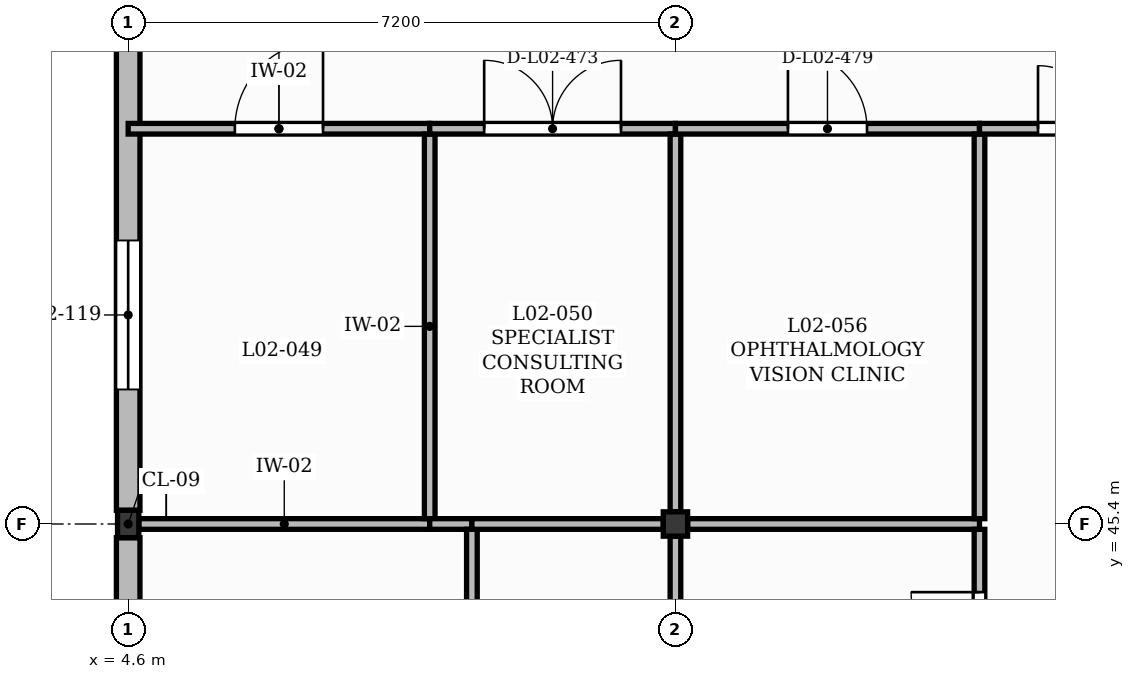
"""IFC4 building model, lengths in metres.
Left out: names, types, materials, properties, quantities, classifications, styles, units other than length and angle.
Written with IfcOpenShell. Run it as: python <this file> out.ifc"""

import sys

from ifc_helpers import new_model, si_unit, direction, frame, frame_2d, origin, origin_2d, place, context, subcontext, project, spatial, rectangle, extrude, element, fill, save


model = new_model("IFC4")
c1 = context("Model", 3, precision=1e-05, world=origin(), true_north=direction((0.0, 1.0)))
c2 = subcontext(c1, "Body", "Model", "MODEL_VIEW")
j1 = project(units=[si_unit("LENGTHUNIT", "METRE"), si_unit("PLANEANGLEUNIT", "RADIAN")], contexts=[c1])
p1 = place(None, origin())
s1 = spatial("IfcSite", under=j1, at=p1, CompositionType="ELEMENT")
p2 = place(p1, origin())
s2 = spatial("IfcBuilding", under=s1, at=p2, CompositionType="ELEMENT")
p3 = place(p2, frame((0.0, 0.0, 9.0)))
s3 = spatial("IfcBuildingStorey", under=s2, at=p3, CompositionType="ELEMENT", Elevation=9.0)
p4 = place(p3, frame((4.6, 45.4, 0.0), z_axis=(0.0, 0.0, 1.0), x_axis=(1.0, 0.0, 0.0)))
e1 = element("IfcColumn", 1, at=p4, inside=s3, PredefinedType="COLUMN", context=c2, shape_type="SweptSolid", body=[
    extrude(rectangle(XDim=0.28, YDim=0.36, at=origin_2d()), origin(), (0.0, 0.0, 1.0), 3.99),
])
p5 = place(p3, frame((11.8, 45.4, 0.0), z_axis=(0.0, 0.0, 1.0), x_axis=(1.0, 0.0, 0.0)))
e2 = element("IfcColumn", 2, at=p5, inside=s3, PredefinedType="COLUMN", context=c2, shape_type="SweptSolid", body=[
    extrude(rectangle(XDim=0.32, YDim=0.32, at=origin_2d()), origin(), (0.0, 0.0, 1.0), 3.99),
])
p6 = place(p3, frame((4.6, 36.96, 0.0), z_axis=(0.0, 0.0, 1.0), x_axis=(0.0, 1.0, 0.0)))
e3 = element("IfcWall", 3, at=p6, inside=s3, PredefinedType="SOLIDWALL", context=c2, shape_type="SweptSolid", body=[
    extrude(rectangle(XDim=8.26, YDim=0.31, at=frame_2d((4.13, 0.0))), origin(), (0.0, 0.0, 1.0), 3.53),
])
p7 = place(p6, frame((2.795, 0.0, 1.05)))
e4 = element("IfcOpeningElement", 4, at=p7, cuts=e3, PredefinedType="OPENING", context=c2, shape_type="SweptSolid", body=[
    extrude(rectangle(XDim=1.68, YDim=1.65, at=frame_2d((0.84, 0.825))), frame((0.0, 0.165, 0.0), z_axis=(0.0, -1.0, 0.0), x_axis=(1.0, 0.0, 0.0)), (0.0, 0.0, 1.0), 0.33),
])
p8 = place(p6, frame((5.155, 0.0, 1.05)))
e5 = element("IfcOpeningElement", 5, at=p8, cuts=e3, PredefinedType="OPENING", context=c2, shape_type="SweptSolid", body=[
    extrude(rectangle(XDim=1.68, YDim=1.65, at=frame_2d((0.84, 0.825))), frame((0.0, 0.165, 0.0), z_axis=(0.0, -1.0, 0.0), x_axis=(1.0, 0.0, 0.0)), (0.0, 0.0, 1.0), 0.33),
])
p9 = place(p3, frame((4.6, 45.58, 0.0), z_axis=(0.0, 0.0, 1.0), x_axis=(0.0, 1.0, 0.0)))
e6 = element("IfcWall", 6, at=p9, inside=s3, PredefinedType="SOLIDWALL", context=c2, shape_type="SweptSolid", body=[
    extrude(rectangle(XDim=6.86, YDim=0.31, at=frame_2d((3.43, 0.0))), origin(), (0.0, 0.0, 1.0), 3.53),
])
p10 = place(p9, frame((1.59, 0.0, 1.05)))
e7 = element("IfcOpeningElement", 7, at=p10, cuts=e6, PredefinedType="OPENING", context=c2, shape_type="SweptSolid", body=[
    extrude(rectangle(XDim=1.96, YDim=1.65, at=frame_2d((0.98, 0.825))), frame((0.0, 0.165, 0.0), z_axis=(0.0, -1.0, 0.0), x_axis=(1.0, 0.0, 0.0)), (0.0, 0.0, 1.0), 0.33),
])
p11 = place(p3, frame((4.74, 45.4, 0.0), z_axis=(0.0, 0.0, 1.0), x_axis=(1.0, 0.0, 0.0)))
e8 = element("IfcWall", 8, at=p11, inside=s3, PredefinedType="PARTITIONING", context=c2, shape_type="SweptSolid", body=[
    extrude(rectangle(XDim=3.827, YDim=0.14, at=frame_2d((1.914, 0.0))), origin(), (0.0, 0.0, 1.0), 3.39),
])
p12 = place(p3, frame((4.6, 50.6, 0.0), z_axis=(0.0, 0.0, 1.0), x_axis=(1.0, 0.0, 0.0)))
e9 = element("IfcWall", 9, at=p12, inside=s3, PredefinedType="PARTITIONING", context=c2, shape_type="SweptSolid", body=[
    extrude(rectangle(XDim=3.967, YDim=0.14, at=frame_2d((1.983, 0.0))), origin(), (0.0, 0.0, 1.0), 3.96),
])
p13 = place(p12, frame((1.404, 0.0, 0.0)))
e10 = element("IfcOpeningElement", 10, at=p13, cuts=e9, PredefinedType="OPENING", context=c2, shape_type="SweptSolid", body=[
    extrude(rectangle(XDim=1.16, YDim=2.1, at=frame_2d((0.58, 1.05))), frame((0.0, 0.08, 0.0), z_axis=(0.0, -1.0, 0.0), x_axis=(1.0, 0.0, 0.0)), (0.0, 0.0, 1.0), 0.16),
])
p14 = place(p3, frame((8.567, 45.47, 0.0), z_axis=(0.0, 0.0, 1.0), x_axis=(0.0, 1.0, 0.0)))
e11 = element("IfcWall", 11, at=p14, inside=s3, PredefinedType="PARTITIONING", context=c2, shape_type="SweptSolid", body=[
    extrude(rectangle(XDim=5.06, YDim=0.14, at=frame_2d((2.53, 0.0))), origin(), (0.0, 0.0, 1.0), 3.96),
])
p15 = place(p3, frame((8.567, 45.4, 0.0), z_axis=(0.0, 0.0, 1.0), x_axis=(1.0, 0.0, 0.0)))
e12 = element("IfcWall", 12, at=p15, inside=s3, PredefinedType="PARTITIONING", context=c2, shape_type="SweptSolid", body=[
    extrude(rectangle(XDim=0.555, YDim=0.14, at=frame_2d((0.278, 0.0))), origin(), (0.0, 0.0, 1.0), 3.39),
])
p16 = place(p3, frame((8.567, 50.6, 0.0), z_axis=(0.0, 0.0, 1.0), x_axis=(1.0, 0.0, 0.0)))
e13 = element("IfcWall", 13, at=p16, inside=s3, PredefinedType="PARTITIONING", context=c2, shape_type="SweptSolid", body=[
    extrude(rectangle(XDim=3.233, YDim=0.14, at=frame_2d((1.617, 0.0))), origin(), (0.0, 0.0, 1.0), 3.96),
])
p17 = place(p16, frame((0.717, 0.0, 0.0)))
e14 = element("IfcOpeningElement", 14, at=p17, cuts=e13, PredefinedType="OPENING", context=c2, shape_type="SweptSolid", body=[
    extrude(rectangle(XDim=1.8, YDim=2.3, at=frame_2d((0.9, 1.15))), frame((0.0, 0.08, 0.0), z_axis=(0.0, -1.0, 0.0), x_axis=(1.0, 0.0, 0.0)), (0.0, 0.0, 1.0), 0.16),
])
p18 = place(p3, frame((9.122, 38.52, 0.0), z_axis=(0.0, 0.0, 1.0), x_axis=(0.0, 1.0, 0.0)))
e15 = element("IfcWall", 15, at=p18, inside=s3, PredefinedType="PARTITIONING", context=c2, shape_type="SweptSolid", body=[
    extrude(rectangle(XDim=6.81, YDim=0.14, at=frame_2d((3.405, 0.0))), origin(), (0.0, 0.0, 1.0), 3.96),
])
p19 = place(p3, frame((9.122, 45.4, 0.0), z_axis=(0.0, 0.0, 1.0), x_axis=(1.0, 0.0, 0.0)))
e16 = element("IfcWall", 16, at=p19, inside=s3, PredefinedType="PARTITIONING", context=c2, shape_type="SweptSolid", body=[
    extrude(rectangle(XDim=2.518, YDim=0.14, at=frame_2d((1.259, 0.0))), origin(), (0.0, 0.0, 1.0), 3.39),
])
p20 = place(p3, frame((11.8, 41.877, 0.0), z_axis=(0.0, 0.0, 1.0), x_axis=(0.0, 1.0, 0.0)))
e17 = element("IfcWall", 17, at=p20, inside=s3, PredefinedType="PARTITIONING", context=c2, shape_type="SweptSolid", body=[
    extrude(rectangle(XDim=3.363, YDim=0.14, at=frame_2d((1.682, 0.0))), origin(), (0.0, 0.0, 1.0), 3.35),
])
p21 = place(p3, frame((11.8, 45.56, 0.0), z_axis=(0.0, 0.0, 1.0), x_axis=(0.0, 1.0, 0.0)))
e18 = element("IfcWall", 18, at=p21, inside=s3, PredefinedType="PARTITIONING", context=c2, shape_type="SweptSolid", body=[
    extrude(rectangle(XDim=4.97, YDim=0.14, at=frame_2d((2.485, 0.0))), origin(), (0.0, 0.0, 1.0), 3.47),
])
p22 = place(p3, frame((11.96, 45.4, 0.0), z_axis=(0.0, 0.0, 1.0), x_axis=(1.0, 0.0, 0.0)))
e19 = element("IfcWall", 19, at=p22, inside=s3, PredefinedType="PARTITIONING", context=c2, shape_type="SweptSolid", body=[
    extrude(rectangle(XDim=3.84, YDim=0.14, at=frame_2d((1.92, 0.0))), origin(), (0.0, 0.0, 1.0), 3.31),
])
p23 = place(p3, frame((11.8, 50.6, 0.0), z_axis=(0.0, 0.0, 1.0), x_axis=(1.0, 0.0, 0.0)))
e20 = element("IfcWall", 20, at=p23, inside=s3, PredefinedType="PARTITIONING", context=c2, shape_type="SweptSolid", body=[
    extrude(rectangle(XDim=4.0, YDim=0.14, at=frame_2d((2.0, 0.0))), origin(), (0.0, 0.0, 1.0), 3.96),
])
p24 = place(p23, frame((1.48, 0.0, 0.0)))
e21 = element("IfcOpeningElement", 21, at=p24, cuts=e20, PredefinedType="OPENING", context=c2, shape_type="SweptSolid", body=[
    extrude(rectangle(XDim=1.04, YDim=2.1, at=frame_2d((0.52, 1.05))), frame((0.0, 0.08, 0.0), z_axis=(0.0, -1.0, 0.0), x_axis=(1.0, 0.0, 0.0)), (0.0, 0.0, 1.0), 0.16),
])
p25 = place(p3, frame((15.8, 41.877, 0.0), z_axis=(0.0, 0.0, 1.0), x_axis=(0.0, 1.0, 0.0)))
e22 = element("IfcWall", 22, at=p25, inside=s3, PredefinedType="PARTITIONING", context=c2, shape_type="SweptSolid", body=[
    extrude(rectangle(XDim=3.453, YDim=0.14, at=frame_2d((1.727, 0.0))), origin(), (0.0, 0.0, 1.0), 3.96),
])
p26 = place(p25, frame((0.826, 0.0, 0.0)))
e23 = element("IfcOpeningElement", 23, at=p26, cuts=e22, PredefinedType="OPENING", context=c2, shape_type="SweptSolid", body=[
    extrude(rectangle(XDim=1.8, YDim=2.3, at=frame_2d((0.9, 1.15))), frame((0.0, 0.08, 0.0), z_axis=(0.0, -1.0, 0.0), x_axis=(1.0, 0.0, 0.0)), (0.0, 0.0, 1.0), 0.16),
])
p27 = place(p3, frame((15.8, 45.47, 0.0), z_axis=(0.0, 0.0, 1.0), x_axis=(0.0, 1.0, 0.0)))
e24 = element("IfcWall", 24, at=p27, inside=s3, PredefinedType="PARTITIONING", context=c2, shape_type="SweptSolid", body=[
    extrude(rectangle(XDim=5.06, YDim=0.14, at=frame_2d((2.53, 0.0))), origin(), (0.0, 0.0, 1.0), 3.96),
])
p28 = place(p3, frame((15.8, 50.6, 0.0), z_axis=(0.0, 0.0, 1.0), x_axis=(1.0, 0.0, 0.0)))
e25 = element("IfcWall", 25, at=p28, inside=s3, PredefinedType="PARTITIONING", context=c2, shape_type="SweptSolid", body=[
    extrude(rectangle(XDim=3.2, YDim=0.14, at=frame_2d((1.6, 0.0))), origin(), (0.0, 0.0, 1.0), 3.96),
])
p29 = place(p28, frame((0.77, 0.0, 0.0)))
e26 = element("IfcOpeningElement", 26, at=p29, cuts=e25, PredefinedType="OPENING", context=c2, shape_type="SweptSolid", body=[
    extrude(rectangle(XDim=1.66, YDim=2.3, at=frame_2d((0.83, 1.15))), frame((0.0, 0.08, 0.0), z_axis=(0.0, -1.0, 0.0), x_axis=(1.0, 0.0, 0.0)), (0.0, 0.0, 1.0), 0.16),
])
p30 = place(p10, origin())
e27 = element("IfcWindow", 27, at=p30, inside=s3, PartitioningType="DOUBLE_PANEL_VERTICAL", PredefinedType="WINDOW", context=c2, shape_type="SweptSolid", body=[
    extrude(rectangle(XDim=1.96, YDim=1.65, at=frame_2d((0.98, 0.825))), frame((0.0, 0.03, 0.0), z_axis=(0.0, -1.0, 0.0), x_axis=(1.0, 0.0, 0.0)), (0.0, 0.0, 1.0), 0.06),
])
fill(e7, e27)
p31 = place(p29, origin())
e28 = element("IfcDoor", 28, at=p31, inside=s3, OperationType="DOUBLE_DOOR_SINGLE_SWING", PredefinedType="DOOR", context=c2, shape_type="SweptSolid", body=[
    extrude(rectangle(XDim=1.66, YDim=2.3, at=frame_2d((0.83, 1.15))), frame((0.0, 0.025, 0.0), z_axis=(0.0, -1.0, 0.0), x_axis=(1.0, 0.0, 0.0)), (0.0, 0.0, 1.0), 0.05),
])
fill(e26, e28)
p32 = place(p13, origin())
e29 = element("IfcDoor", 29, at=p32, inside=s3, OperationType="SINGLE_SWING_RIGHT", PredefinedType="DOOR", context=c2, shape_type="SweptSolid", body=[
    extrude(rectangle(XDim=1.16, YDim=2.1, at=frame_2d((0.58, 1.05))), frame((0.0, 0.025, 0.0), z_axis=(0.0, -1.0, 0.0), x_axis=(1.0, 0.0, 0.0)), (0.0, 0.0, 1.0), 0.05),
])
fill(e10, e29)
p33 = place(p17, origin())
e30 = element("IfcDoor", 30, at=p33, inside=s3, OperationType="DOUBLE_DOOR_SINGLE_SWING", PredefinedType="DOOR", context=c2, shape_type="SweptSolid", body=[
    extrude(rectangle(XDim=1.8, YDim=2.3, at=frame_2d((0.9, 1.15))), frame((0.0, 0.025, 0.0), z_axis=(0.0, -1.0, 0.0), x_axis=(1.0, 0.0, 0.0)), (0.0, 0.0, 1.0), 0.05),
])
fill(e14, e30)
p34 = place(p26, origin())
e31 = element("IfcDoor", 31, at=p34, inside=s3, OperationType="DOUBLE_DOOR_SINGLE_SWING", PredefinedType="DOOR", context=c2, shape_type="SweptSolid", body=[
    extrude(rectangle(XDim=1.8, YDim=2.3, at=frame_2d((0.9, 1.15))), frame((0.0, 0.025, 0.0), z_axis=(0.0, -1.0, 0.0), x_axis=(1.0, 0.0, 0.0)), (0.0, 0.0, 1.0), 0.05),
])
fill(e23, e31)
p35 = place(p24, origin())
e32 = element("IfcDoor", 32, at=p35, inside=s3, OperationType="SINGLE_SWING_LEFT", PredefinedType="DOOR", context=c2, shape_type="SweptSolid", body=[
    extrude(rectangle(XDim=1.04, YDim=2.1, at=frame_2d((0.52, 1.05))), frame((0.0, 0.025, 0.0), z_axis=(0.0, -1.0, 0.0), x_axis=(1.0, 0.0, 0.0)), (0.0, 0.0, 1.0), 0.05),
])
fill(e21, e32)
save(model, sys.argv[1])
